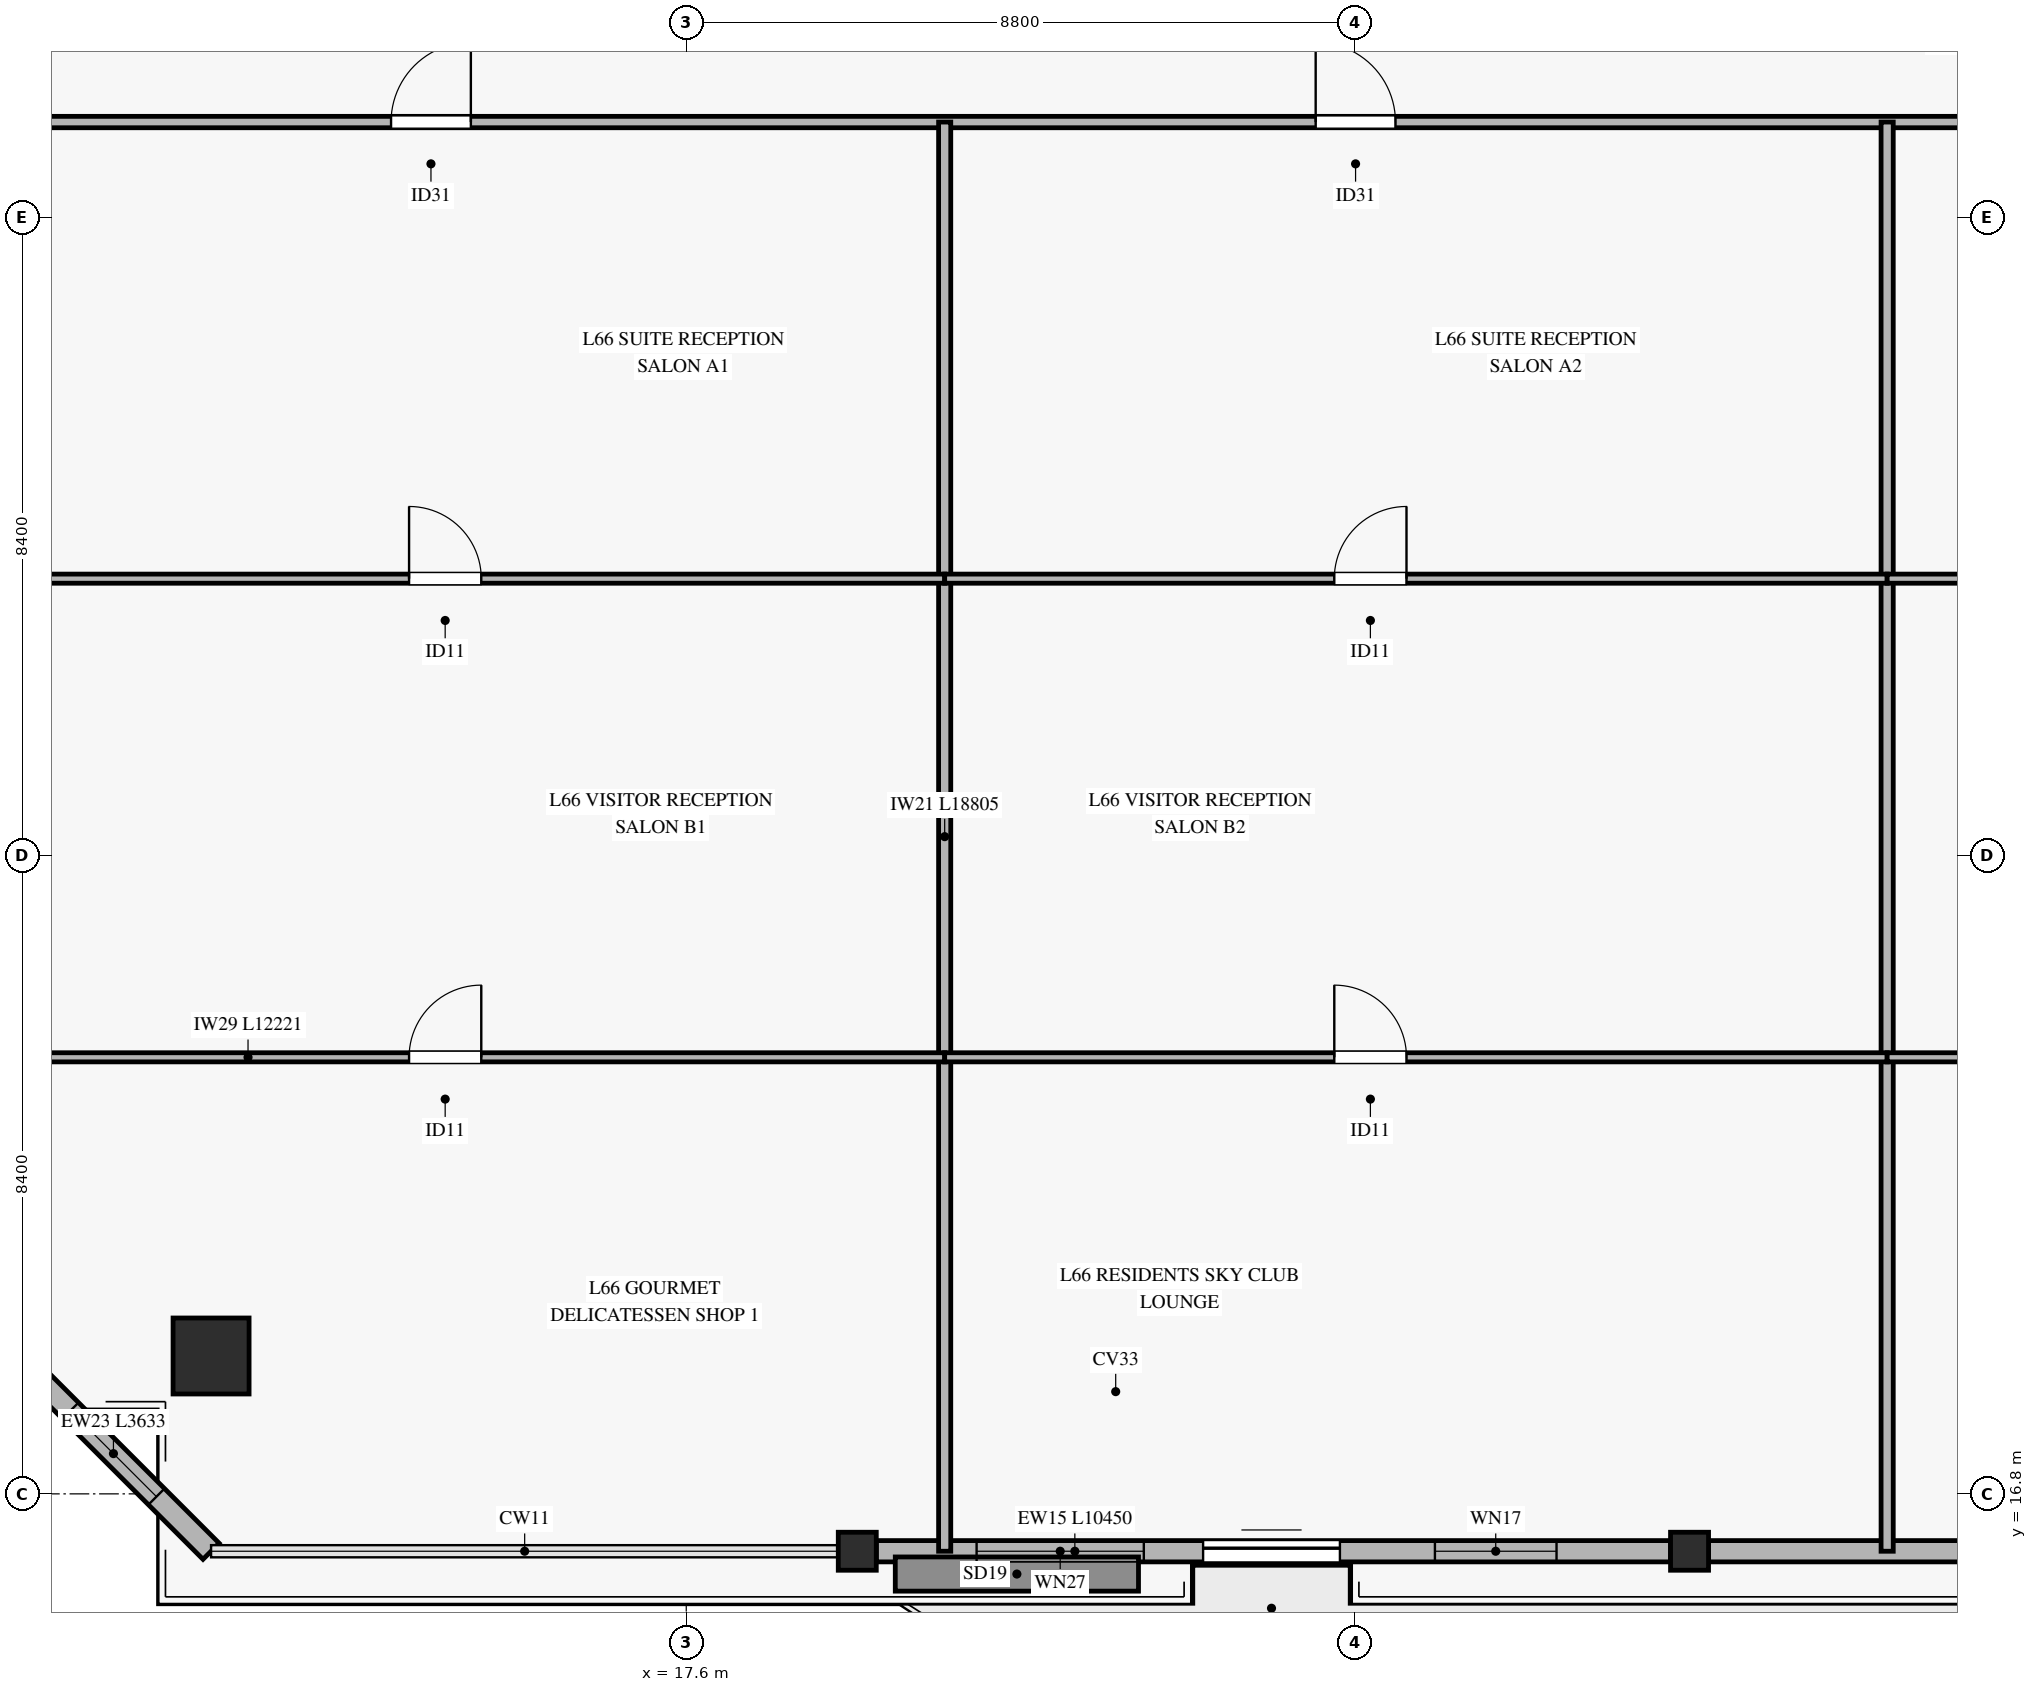
"""IFC4 building model, lengths in metres.
Left out: names, types, materials, properties, quantities, classifications, styles, units other than length and angle.
Written with IfcOpenShell. Run it as: python <this file> out.ifc"""

import sys

from ifc_helpers import new_model, si_unit, direction, frame, frame_2d, origin, origin_2d, place, context, subcontext, project, spatial, rectangle, hollow_rectangle, extrude, source, transform, mapped, element, fill, save


model = new_model("IFC4")
c1 = context("Model", 3, precision=1e-05, world=origin(), true_north=direction((0.0, 1.0)))
c2 = subcontext(c1, "Body", "Model", "MODEL_VIEW")
j1 = project(units=[si_unit("LENGTHUNIT", "METRE"), si_unit("PLANEANGLEUNIT", "RADIAN")], contexts=[c1])
p1 = place(None, origin())
s1 = spatial("IfcSite", under=j1, at=p1, CompositionType="ELEMENT")
p2 = place(p1, origin())
s2 = spatial("IfcBuilding", under=s1, at=p2, CompositionType="ELEMENT")
p3 = place(p2, frame((0.0, 0.0, 258.7)))
s3 = spatial("IfcBuildingStorey", under=s2, at=p3, CompositionType="ELEMENT", Elevation=258.7)
m1 = source(origin(), c2, "Body", "SweptSolid", [
    extrude(hollow_rectangle(XDim=1.0, YDim=1.0, WallThickness=0.045, at=origin_2d()), origin(), (0.0, 0.0, 1.0), 3.185),
])
p4 = place(p3, frame((11.348, 18.614, 0.0), z_axis=(0.0, 0.0, 1.0), x_axis=(1.0, 0.0, 0.0)))
e1 = element("IfcColumn", 1, at=p4, inside=s3, PredefinedType="COLUMN", context=c2, shape_type="MappedRepresentation", body=[
    mapped(m1, transform((0.0, 0.0, 0.0), x_axis=(1.0, 0.0, 0.0), y_axis=(0.0, 1.0, 0.0), z_axis=(0.0, 0.0, 1.0), scale=1.0)),
])
m2 = source(origin(), c2, "Body", "SweptSolid", [
    extrude(hollow_rectangle(XDim=0.5, YDim=0.5, WallThickness=0.024, at=origin_2d()), origin(), (0.0, 0.0, 1.0), 3.185),
])
for number, where, z_axis, x_axis in (
    (2, (19.85, 16.045, 0.0), (0.0, 0.0, 1.0), (1.0, 0.0, 0.0)),
    (3, (30.8, 16.045, 0.0), (0.0, 0.0, 1.0), (1.0, 0.0, 0.0)),
):
    element("IfcColumn", number, at=place(p3, frame(where, z_axis=z_axis, x_axis=x_axis)), inside=s3, PredefinedType="COLUMN", context=c2, shape_type="MappedRepresentation", body=[
        mapped(m2, transform((0.0, 0.0, 0.0), x_axis=(1.0, 0.0, 0.0), y_axis=(0.0, 1.0, 0.0), z_axis=(0.0, 0.0, 1.0), scale=1.0)),
    ])
p5 = place(p3, frame((20.1, 16.045, 0.0), z_axis=(0.0, 0.0, 1.0), x_axis=(1.0, 0.0, 0.0)))
e4 = element("IfcWall", 4, at=p5, inside=s3, PredefinedType="SOLIDWALL", context=c2, shape_type="SweptSolid", body=[
    extrude(rectangle(XDim=10.45, YDim=0.28, at=frame_2d((5.225, 0.0))), origin(), (0.0, 0.0, 1.0), 2.815),
])
p6 = place(p5, frame((4.3, 0.0, 0.0)))
e5 = element("IfcOpeningElement", 5, at=p6, cuts=e4, PredefinedType="OPENING", context=c2, shape_type="SweptSolid", body=[
    extrude(rectangle(XDim=1.8, YDim=2.25, at=frame_2d((0.9, 1.125))), frame((0.0, 0.15, 0.0), z_axis=(0.0, -1.0, 0.0), x_axis=(1.0, 0.0, 0.0)), (0.0, 0.0, 1.0), 0.3),
])
p7 = place(p5, frame((1.32, 0.0, 0.45)))
e6 = element("IfcOpeningElement", 6, at=p7, cuts=e4, PredefinedType="OPENING", context=c2, shape_type="SweptSolid", body=[
    extrude(rectangle(XDim=2.2, YDim=2.1, at=frame_2d((1.1, 1.05))), frame((0.0, 0.15, 0.0), z_axis=(0.0, -1.0, 0.0), x_axis=(1.0, 0.0, 0.0)), (0.0, 0.0, 1.0), 0.3),
])
p8 = place(p5, frame((7.35, 0.0, 0.45)))
e7 = element("IfcOpeningElement", 7, at=p8, cuts=e4, PredefinedType="OPENING", context=c2, shape_type="SweptSolid", body=[
    extrude(rectangle(XDim=1.6, YDim=2.0, at=frame_2d((0.8, 1.0))), frame((0.0, 0.15, 0.0), z_axis=(0.0, -1.0, 0.0), x_axis=(1.0, 0.0, 0.0)), (0.0, 0.0, 1.0), 0.3),
])
p9 = place(p3, frame((31.05, 16.045, 0.0), z_axis=(0.0, 0.0, 1.0), x_axis=(1.0, 0.0, 0.0)))
e8 = element("IfcWall", 8, at=p9, inside=s3, PredefinedType="SOLIDWALL", context=c2, shape_type="SweptSolid", body=[
    extrude(rectangle(XDim=6.25, YDim=0.28, at=frame_2d((3.125, 0.0))), origin(), (0.0, 0.0, 1.0), 2.815),
])
p10 = place(p3, frame((8.779, 18.614, 0.0), z_axis=(0.0, 0.0, 1.0), x_axis=(0.707073180636, -0.70714038014, 0.0)))
e9 = element("IfcWall", 9, at=p10, inside=s3, PredefinedType="SOLIDWALL", context=c2, shape_type="SweptSolid", body=[
    extrude(rectangle(XDim=3.633, YDim=0.3, at=frame_2d((1.816, 0.0))), origin(), (0.0, 0.0, 1.0), 2.815),
])
p11 = place(p10, frame((1.017, 0.0, 0.45)))
e10 = element("IfcOpeningElement", 10, at=p11, cuts=e9, PredefinedType="OPENING", context=c2, shape_type="SweptSolid", body=[
    extrude(rectangle(XDim=1.6, YDim=2.0, at=frame_2d((0.8, 1.0))), frame((0.0, 0.16, 0.0), z_axis=(0.0, -1.0, 0.0), x_axis=(1.0, 0.0, 0.0)), (0.0, 0.0, 1.0), 0.32),
])
p12 = place(p3, frame((8.779, 34.85, 0.0), z_axis=(0.0, 0.0, 1.0), x_axis=(1.0, 0.0, 0.0)))
e11 = element("IfcWall", 11, at=p12, inside=s3, PredefinedType="PARTITIONING", context=c2, shape_type="SweptSolid", body=[
    extrude(rectangle(XDim=52.843, YDim=0.15, at=frame_2d((26.421, 0.0))), origin(), (0.0, 0.0, 1.0), 2.47),
])
p13 = place(p12, frame((4.937, 0.0, 0.0)))
e12 = element("IfcOpeningElement", 12, at=p13, cuts=e11, PredefinedType="OPENING", context=c2, shape_type="SweptSolid", body=[
    extrude(rectangle(XDim=1.05, YDim=2.15, at=frame_2d((0.525, 1.075))), frame((0.0, 0.085, 0.0), z_axis=(0.0, -1.0, 0.0), x_axis=(1.0, 0.0, 0.0)), (0.0, 0.0, 1.0), 0.17),
])
p14 = place(p12, frame((17.102, 0.0, 0.0)))
e13 = element("IfcOpeningElement", 13, at=p14, cuts=e11, PredefinedType="OPENING", context=c2, shape_type="SweptSolid", body=[
    extrude(rectangle(XDim=1.05, YDim=2.15, at=frame_2d((0.525, 1.075))), frame((0.0, 0.085, 0.0), z_axis=(0.0, -1.0, 0.0), x_axis=(1.0, 0.0, 0.0)), (0.0, 0.0, 1.0), 0.17),
])
p15 = place(p12, frame((29.122, 0.0, 0.0)))
e14 = element("IfcOpeningElement", 14, at=p15, cuts=e11, PredefinedType="OPENING", context=c2, shape_type="SweptSolid", body=[
    extrude(rectangle(XDim=1.05, YDim=2.15, at=frame_2d((0.525, 1.075))), frame((0.0, 0.085, 0.0), z_axis=(0.0, -1.0, 0.0), x_axis=(1.0, 0.0, 0.0)), (0.0, 0.0, 1.0), 0.17),
])
p16 = place(p12, frame((42.507, 0.0, 0.0)))
e15 = element("IfcOpeningElement", 15, at=p16, cuts=e11, PredefinedType="OPENING", context=c2, shape_type="SweptSolid", body=[
    extrude(rectangle(XDim=1.05, YDim=2.15, at=frame_2d((0.525, 1.075))), frame((0.0, 0.085, 0.0), z_axis=(0.0, -1.0, 0.0), x_axis=(1.0, 0.0, 0.0)), (0.0, 0.0, 1.0), 0.17),
])
for number, where, z_axis, x_axis in (
    (16, (21.0, 16.045, 0.0), (0.0, 0.0, 1.0), (0.0, 1.0, 0.0)),
    (17, (33.4, 16.045, 0.0), (0.0, 0.0, 1.0), (0.0, 1.0, 0.0)),
):
    element("IfcWall", number, at=place(p3, frame(where, z_axis=z_axis, x_axis=x_axis)), inside=s3, PredefinedType="PARTITIONING", context=c2, shape_type="SweptSolid", body=[
        extrude(rectangle(XDim=18.805, YDim=0.16, at=frame_2d((9.403, 0.0))), origin(), (0.0, 0.0, 1.0), 2.77),
    ])
p17 = place(p3, frame((8.779, 22.544, 0.0), z_axis=(0.0, 0.0, 1.0), x_axis=(1.0, 0.0, 0.0)))
e18 = element("IfcWall", 18, at=p17, inside=s3, PredefinedType="PARTITIONING", context=c2, shape_type="SweptSolid", body=[
    extrude(rectangle(XDim=12.221, YDim=0.12, at=frame_2d((6.11, 0.0))), origin(), (0.0, 0.0, 1.0), 2.47),
])
p18 = place(p17, frame((5.174, 0.0, 0.0)))
e19 = element("IfcOpeningElement", 19, at=p18, cuts=e18, PredefinedType="OPENING", context=c2, shape_type="SweptSolid", body=[
    extrude(rectangle(XDim=0.95, YDim=2.1, at=frame_2d((0.475, 1.05))), frame((0.0, 0.07, 0.0), z_axis=(0.0, -1.0, 0.0), x_axis=(1.0, 0.0, 0.0)), (0.0, 0.0, 1.0), 0.14),
])
p19 = place(p3, frame((8.779, 28.842, 0.0), z_axis=(0.0, 0.0, 1.0), x_axis=(1.0, 0.0, 0.0)))
e20 = element("IfcWall", 20, at=p19, inside=s3, PredefinedType="PARTITIONING", context=c2, shape_type="SweptSolid", body=[
    extrude(rectangle(XDim=12.221, YDim=0.12, at=frame_2d((6.11, 0.0))), origin(), (0.0, 0.0, 1.0), 2.47),
])
p20 = place(p19, frame((5.174, 0.0, 0.0)))
e21 = element("IfcOpeningElement", 21, at=p20, cuts=e20, PredefinedType="OPENING", context=c2, shape_type="SweptSolid", body=[
    extrude(rectangle(XDim=0.95, YDim=2.1, at=frame_2d((0.475, 1.05))), frame((0.0, 0.07, 0.0), z_axis=(0.0, -1.0, 0.0), x_axis=(1.0, 0.0, 0.0)), (0.0, 0.0, 1.0), 0.14),
])
p21 = place(p3, frame((21.0, 22.544, 0.0), z_axis=(0.0, 0.0, 1.0), x_axis=(1.0, 0.0, 0.0)))
e22 = element("IfcWall", 22, at=p21, inside=s3, PredefinedType="PARTITIONING", context=c2, shape_type="SweptSolid", body=[
    extrude(rectangle(XDim=12.4, YDim=0.12, at=frame_2d((6.2, 0.0))), origin(), (0.0, 0.0, 1.0), 2.47),
])
p22 = place(p21, frame((5.126, 0.0, 0.0)))
e23 = element("IfcOpeningElement", 23, at=p22, cuts=e22, PredefinedType="OPENING", context=c2, shape_type="SweptSolid", body=[
    extrude(rectangle(XDim=0.95, YDim=2.1, at=frame_2d((0.475, 1.05))), frame((0.0, 0.07, 0.0), z_axis=(0.0, -1.0, 0.0), x_axis=(1.0, 0.0, 0.0)), (0.0, 0.0, 1.0), 0.14),
])
p23 = place(p3, frame((21.0, 28.842, 0.0), z_axis=(0.0, 0.0, 1.0), x_axis=(1.0, 0.0, 0.0)))
e24 = element("IfcWall", 24, at=p23, inside=s3, PredefinedType="PARTITIONING", context=c2, shape_type="SweptSolid", body=[
    extrude(rectangle(XDim=12.4, YDim=0.12, at=frame_2d((6.2, 0.0))), origin(), (0.0, 0.0, 1.0), 2.47),
])
p24 = place(p23, frame((5.126, 0.0, 0.0)))
e25 = element("IfcOpeningElement", 25, at=p24, cuts=e24, PredefinedType="OPENING", context=c2, shape_type="SweptSolid", body=[
    extrude(rectangle(XDim=0.95, YDim=2.1, at=frame_2d((0.475, 1.05))), frame((0.0, 0.07, 0.0), z_axis=(0.0, -1.0, 0.0), x_axis=(1.0, 0.0, 0.0)), (0.0, 0.0, 1.0), 0.14),
])
p25 = place(p3, frame((33.4, 22.544, 0.0), z_axis=(0.0, 0.0, 1.0), x_axis=(1.0, 0.0, 0.0)))
e26 = element("IfcWall", 26, at=p25, inside=s3, PredefinedType="PARTITIONING", context=c2, shape_type="SweptSolid", body=[
    extrude(rectangle(XDim=11.4, YDim=0.12, at=frame_2d((5.7, 0.0))), origin(), (0.0, 0.0, 1.0), 2.47),
])
p26 = place(p25, frame((4.726, 0.0, 0.0)))
e27 = element("IfcOpeningElement", 27, at=p26, cuts=e26, PredefinedType="OPENING", context=c2, shape_type="SweptSolid", body=[
    extrude(rectangle(XDim=0.95, YDim=2.1, at=frame_2d((0.475, 1.05))), frame((0.0, 0.07, 0.0), z_axis=(0.0, -1.0, 0.0), x_axis=(1.0, 0.0, 0.0)), (0.0, 0.0, 1.0), 0.14),
])
p27 = place(p3, frame((33.4, 28.842, 0.0), z_axis=(0.0, 0.0, 1.0), x_axis=(1.0, 0.0, 0.0)))
e28 = element("IfcWall", 28, at=p27, inside=s3, PredefinedType="PARTITIONING", context=c2, shape_type="SweptSolid", body=[
    extrude(rectangle(XDim=11.4, YDim=0.12, at=frame_2d((5.7, 0.0))), origin(), (0.0, 0.0, 1.0), 2.47),
])
p28 = place(p27, frame((4.726, 0.0, 0.0)))
e29 = element("IfcOpeningElement", 29, at=p28, cuts=e28, PredefinedType="OPENING", context=c2, shape_type="SweptSolid", body=[
    extrude(rectangle(XDim=0.95, YDim=2.1, at=frame_2d((0.475, 1.05))), frame((0.0, 0.07, 0.0), z_axis=(0.0, -1.0, 0.0), x_axis=(1.0, 0.0, 0.0)), (0.0, 0.0, 1.0), 0.14),
])
m3 = source(origin(), c2, "Body", "SweptSolid", [
    extrude(rectangle(XDim=1.8, YDim=2.25, at=frame_2d((0.9, 1.125))), frame((0.0, 0.025, 0.0), z_axis=(0.0, -1.0, 0.0), x_axis=(1.0, 0.0, 0.0)), (0.0, 0.0, 1.0), 0.05),
])
p29 = place(p6, origin())
e30 = element("IfcDoor", 30, at=p29, inside=s3, OperationType="SLIDING_TO_LEFT", PredefinedType="DOOR", context=c2, shape_type="MappedRepresentation", body=[
    mapped(m3, transform((0.0, 0.0, 0.0), x_axis=(1.0, 0.0, 0.0), y_axis=(0.0, 1.0, 0.0), z_axis=(0.0, 0.0, 1.0), scale=1.0)),
])
fill(e5, e30)
m4 = source(origin(), c2, "Body", "SweptSolid", [
    extrude(rectangle(XDim=2.2, YDim=2.1, at=frame_2d((1.1, 1.05))), frame((0.0, 0.03, 0.0), z_axis=(0.0, -1.0, 0.0), x_axis=(1.0, 0.0, 0.0)), (0.0, 0.0, 1.0), 0.06),
])
p30 = place(p7, origin())
e31 = element("IfcWindow", 31, at=p30, inside=s3, PartitioningType="SINGLE_PANEL", PredefinedType="WINDOW", context=c2, shape_type="MappedRepresentation", body=[
    mapped(m4, transform((0.0, 0.0, 0.0), x_axis=(1.0, 0.0, 0.0), y_axis=(0.0, 1.0, 0.0), z_axis=(0.0, 0.0, 1.0), scale=1.0)),
])
fill(e6, e31)
m5 = source(origin(), c2, "Body", "SweptSolid", [
    extrude(rectangle(XDim=1.6, YDim=2.0, at=frame_2d((0.8, 1.0))), frame((0.0, 0.03, 0.0), z_axis=(0.0, -1.0, 0.0), x_axis=(1.0, 0.0, 0.0)), (0.0, 0.0, 1.0), 0.06),
])
p31 = place(p8, origin())
e32 = element("IfcWindow", 32, at=p31, inside=s3, PartitioningType="SINGLE_PANEL", PredefinedType="WINDOW", context=c2, shape_type="MappedRepresentation", body=[
    mapped(m5, transform((0.0, 0.0, 0.0), x_axis=(1.0, 0.0, 0.0), y_axis=(0.0, 1.0, 0.0), z_axis=(0.0, 0.0, 1.0), scale=1.0)),
])
fill(e7, e32)
p32 = place(p11, origin())
e33 = element("IfcWindow", 33, at=p32, inside=s3, PartitioningType="SINGLE_PANEL", PredefinedType="WINDOW", context=c2, shape_type="MappedRepresentation", body=[
    mapped(m5, transform((0.0, 0.0, 0.0), x_axis=(1.0, 0.0, 0.0), y_axis=(0.0, 1.0, 0.0), z_axis=(0.0, 0.0, 1.0), scale=1.0)),
])
fill(e10, e33)
m6 = source(origin(), c2, "Body", "SweptSolid", [
    extrude(rectangle(XDim=1.05, YDim=2.15, at=frame_2d((0.525, 1.075))), frame((0.0, 0.025, 0.0), z_axis=(0.0, -1.0, 0.0), x_axis=(1.0, 0.0, 0.0)), (0.0, 0.0, 1.0), 0.05),
])
p33 = place(p13, origin())
e34 = element("IfcDoor", 34, at=p33, inside=s3, OperationType="SINGLE_SWING_RIGHT", PredefinedType="DOOR", context=c2, shape_type="MappedRepresentation", body=[
    mapped(m6, transform((0.0, 0.0, 0.0), x_axis=(1.0, 0.0, 0.0), y_axis=(0.0, 1.0, 0.0), z_axis=(0.0, 0.0, 1.0), scale=1.0)),
])
fill(e12, e34)
m7 = source(origin(), c2, "Body", "SweptSolid", [
    extrude(rectangle(XDim=0.95, YDim=2.1, at=frame_2d((0.475, 1.05))), frame((0.0, 0.025, 0.0), z_axis=(0.0, -1.0, 0.0), x_axis=(1.0, 0.0, 0.0)), (0.0, 0.0, 1.0), 0.05),
])
p34 = place(p20, origin())
e35 = element("IfcDoor", 35, at=p34, inside=s3, OperationType="SINGLE_SWING_LEFT", PredefinedType="DOOR", context=c2, shape_type="MappedRepresentation", body=[
    mapped(m7, transform((0.0, 0.0, 0.0), x_axis=(1.0, 0.0, 0.0), y_axis=(0.0, 1.0, 0.0), z_axis=(0.0, 0.0, 1.0), scale=1.0)),
])
fill(e21, e35)
p35 = place(p18, origin())
e36 = element("IfcDoor", 36, at=p35, inside=s3, OperationType="SINGLE_SWING_RIGHT", PredefinedType="DOOR", context=c2, shape_type="MappedRepresentation", body=[
    mapped(m7, transform((0.0, 0.0, 0.0), x_axis=(1.0, 0.0, 0.0), y_axis=(0.0, 1.0, 0.0), z_axis=(0.0, 0.0, 1.0), scale=1.0)),
])
fill(e19, e36)
p36 = place(p14, origin())
e37 = element("IfcDoor", 37, at=p36, inside=s3, OperationType="SINGLE_SWING_LEFT", PredefinedType="DOOR", context=c2, shape_type="MappedRepresentation", body=[
    mapped(m6, transform((0.0, 0.0, 0.0), x_axis=(1.0, 0.0, 0.0), y_axis=(0.0, 1.0, 0.0), z_axis=(0.0, 0.0, 1.0), scale=1.0)),
])
fill(e13, e37)
p37 = place(p24, origin())
e38 = element("IfcDoor", 38, at=p37, inside=s3, OperationType="SINGLE_SWING_RIGHT", PredefinedType="DOOR", context=c2, shape_type="MappedRepresentation", body=[
    mapped(m7, transform((0.0, 0.0, 0.0), x_axis=(1.0, 0.0, 0.0), y_axis=(0.0, 1.0, 0.0), z_axis=(0.0, 0.0, 1.0), scale=1.0)),
])
fill(e25, e38)
p38 = place(p22, origin())
e39 = element("IfcDoor", 39, at=p38, inside=s3, OperationType="SINGLE_SWING_LEFT", PredefinedType="DOOR", context=c2, shape_type="MappedRepresentation", body=[
    mapped(m7, transform((0.0, 0.0, 0.0), x_axis=(1.0, 0.0, 0.0), y_axis=(0.0, 1.0, 0.0), z_axis=(0.0, 0.0, 1.0), scale=1.0)),
])
fill(e23, e39)
save(model, sys.argv[1])
